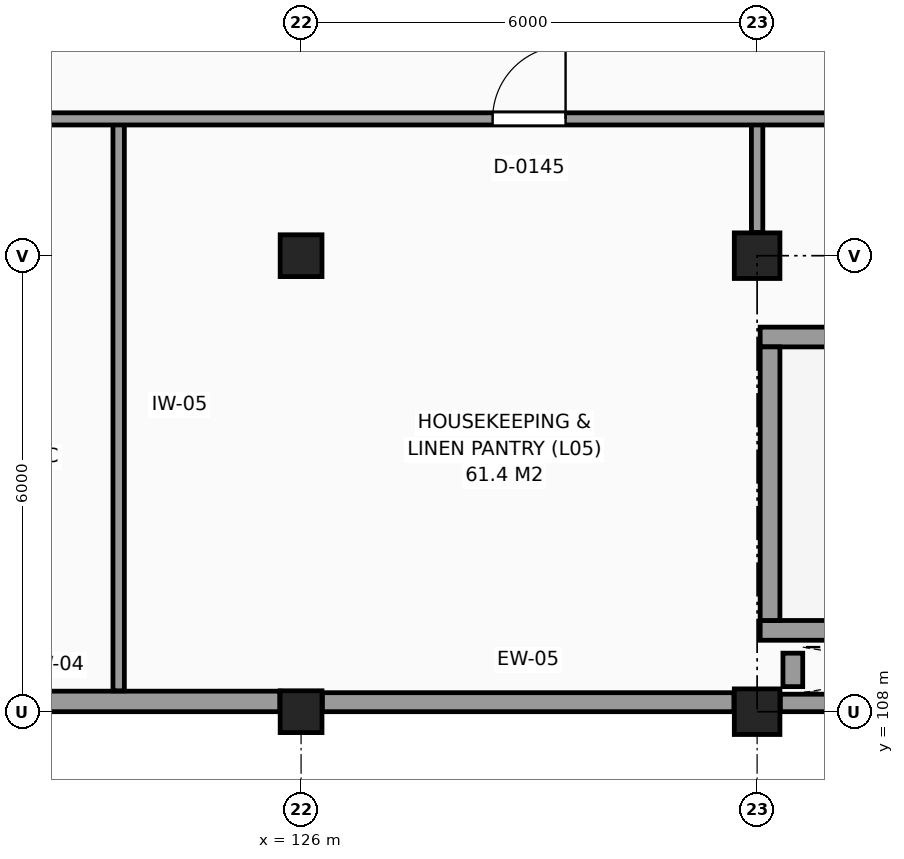
"""IFC4 building model, lengths in metres.
Left out: names, types, materials, properties, quantities, classifications, styles, units other than length and angle.
Written with IfcOpenShell. Run it as: python <this file> out.ifc"""

import sys

from ifc_helpers import new_model, si_unit, direction, frame, frame_2d, origin, origin_2d, place, context, subcontext, project, spatial, rectangle, extrude, element, fill, save


model = new_model("IFC4")
c1 = context("Model", 3, precision=1e-05, world=origin(), true_north=direction((0.0, 1.0)))
c2 = subcontext(c1, "Body", "Model", "MODEL_VIEW")
j1 = project(units=[si_unit("LENGTHUNIT", "METRE"), si_unit("PLANEANGLEUNIT", "RADIAN")], contexts=[c1])
p1 = place(None, origin())
s1 = spatial("IfcSite", under=j1, at=p1, CompositionType="ELEMENT")
p2 = place(p1, origin())
s2 = spatial("IfcBuilding", under=s1, at=p2, CompositionType="ELEMENT")
p3 = place(p2, frame((0.0, 0.0, 24.6)))
s3 = spatial("IfcBuildingStorey", under=s2, at=p3, CompositionType="ELEMENT", Elevation=24.6)
for number, where, z_axis, x_axis in (
    (1, (126.0, 108.0, 0.0), (0.0, 0.0, 1.0), (1.0, 0.0, 0.0)),
    (2, (126.0, 114.0, 0.0), (0.0, 0.0, 1.0), (1.0, 0.0, 0.0)),
):
    element("IfcColumn", number, at=place(p3, frame(where, z_axis=z_axis, x_axis=x_axis)), inside=s3, PredefinedType="COLUMN", context=c2, shape_type="SweptSolid", body=[
        extrude(rectangle(XDim=0.55, YDim=0.55, at=origin_2d()), origin(), (0.0, 0.0, 1.0), 3.6),
    ])
for number, where, z_axis, x_axis in (
    (3, (132.0, 108.0, 0.0), (0.0, 0.0, 1.0), (1.0, 0.0, 0.0)),
    (4, (132.0, 114.0, 0.0), (0.0, 0.0, 1.0), (1.0, 0.0, 0.0)),
):
    element("IfcColumn", number, at=place(p3, frame(where, z_axis=z_axis, x_axis=x_axis)), inside=s3, PredefinedType="COLUMN", context=c2, shape_type="SweptSolid", body=[
        extrude(rectangle(XDim=0.6, YDim=0.6, at=origin_2d()), origin(), (0.0, 0.0, 1.0), 3.6),
    ])
p4 = place(p3, frame((120.305, 108.135, 0.0), z_axis=(0.0, 0.0, 1.0), x_axis=(1.0, 0.0, 0.0)))
e5 = element("IfcWall", 5, at=p4, inside=s3, PredefinedType="SOLIDWALL", context=c2, shape_type="SweptSolid", body=[
    extrude(rectangle(XDim=5.415, YDim=0.27, at=frame_2d((2.708, 0.0))), origin(), (0.0, 0.0, 1.0), 2.73),
])
p5 = place(p3, frame((126.28, 108.125, 0.0), z_axis=(0.0, 0.0, 1.0), x_axis=(1.0, 0.0, 0.0)))
e6 = element("IfcWall", 6, at=p5, inside=s3, PredefinedType="SOLIDWALL", context=c2, shape_type="SweptSolid", body=[
    extrude(rectangle(XDim=5.415, YDim=0.25, at=frame_2d((2.708, 0.0))), origin(), (0.0, 0.0, 1.0), 2.73),
])
p6 = place(p3, frame((132.305, 108.115, 0.0), z_axis=(0.0, 0.0, 1.0), x_axis=(1.0, 0.0, 0.0)))
e7 = element("IfcWall", 7, at=p6, inside=s3, PredefinedType="SOLIDWALL", context=c2, shape_type="SweptSolid", body=[
    extrude(rectangle(XDim=5.415, YDim=0.23, at=frame_2d((2.708, 0.0))), origin(), (0.0, 0.0, 1.0), 3.38),
])
for number, where, z_axis, x_axis in (
    (8, (132.04, 109.07, 0.0), (0.0, 0.0, 1.0), (1.0, 0.0, 0.0)),
    (9, (132.04, 112.93, 0.0), (0.0, 0.0, 1.0), (1.0, 0.0, 0.0)),
):
    element("IfcWall", number, at=place(p3, frame(where, z_axis=z_axis, x_axis=x_axis)), inside=s3, PredefinedType="SHEAR", context=c2, shape_type="SweptSolid", body=[
        extrude(rectangle(XDim=10.72, YDim=0.26, at=frame_2d((5.36, 0.0))), origin(), (0.0, 0.0, 1.0), 3.6),
    ])
p7 = place(p3, frame((132.17, 109.2, 0.0), z_axis=(0.0, 0.0, 1.0), x_axis=(0.0, 1.0, 0.0)))
e10 = element("IfcWall", 10, at=p7, inside=s3, PredefinedType="SHEAR", context=c2, shape_type="SweptSolid", body=[
    extrude(rectangle(XDim=3.6, YDim=0.26, at=frame_2d((1.8, 0.0))), origin(), (0.0, 0.0, 1.0), 3.6),
])
p8 = place(p3, frame((132.47, 108.33, 0.0), z_axis=(0.0, 0.0, 1.0), x_axis=(0.0, 1.0, 0.0)))
e11 = element("IfcWall", 11, at=p8, inside=s3, PredefinedType="SHEAR", context=c2, shape_type="SweptSolid", body=[
    extrude(rectangle(XDim=0.44, YDim=0.26, at=frame_2d((0.22, 0.0))), origin(), (0.0, 0.0, 1.0), 3.6),
])
p9 = place(p3, frame((123.6, 108.275, 0.0), z_axis=(0.0, 0.0, 1.0), x_axis=(0.0, 1.0, 0.0)))
e12 = element("IfcWall", 12, at=p9, inside=s3, PredefinedType="PARTITIONING", context=c2, shape_type="SweptSolid", body=[
    extrude(rectangle(XDim=7.525, YDim=0.15, at=frame_2d((3.763, 0.0))), origin(), (0.0, 0.0, 1.0), 3.38),
])
p10 = place(p3, frame((132.0, 114.305, 0.0), z_axis=(0.0, 0.0, 1.0), x_axis=(0.0, 1.0, 0.0)))
e13 = element("IfcWall", 13, at=p10, inside=s3, PredefinedType="PARTITIONING", context=c2, shape_type="SweptSolid", body=[
    extrude(rectangle(XDim=1.495, YDim=0.15, at=frame_2d((0.748, 0.0))), origin(), (0.0, 0.0, 1.0), 2.58),
])
p11 = place(p3, frame((66.255, 115.8, 0.0), z_axis=(0.0, 0.0, 1.0), x_axis=(1.0, 0.0, 0.0)))
e14 = element("IfcWall", 14, at=p11, inside=s3, PredefinedType="PARTITIONING", context=c2, shape_type="SweptSolid", body=[
    extrude(rectangle(XDim=103.545, YDim=0.16, at=frame_2d((51.772, 0.0))), origin(), (0.0, 0.0, 1.0), 3.38),
])
p12 = place(p11, frame((80.145, 0.0, 0.0)))
e15 = element("IfcOpeningElement", 15, at=p12, cuts=e14, PredefinedType="OPENING", context=c2, shape_type="SweptSolid", body=[
    extrude(rectangle(XDim=1.2, YDim=2.2, at=frame_2d((0.6, 1.1))), frame((0.0, 0.09, 0.0), z_axis=(0.0, -1.0, 0.0), x_axis=(1.0, 0.0, 0.0)), (0.0, 0.0, 1.0), 0.18),
])
p13 = place(p11, frame((50.145, 0.0, 0.0)))
e16 = element("IfcOpeningElement", 16, at=p13, cuts=e14, PredefinedType="OPENING", context=c2, shape_type="SweptSolid", body=[
    extrude(rectangle(XDim=1.2, YDim=2.2, at=frame_2d((0.6, 1.1))), frame((0.0, 0.09, 0.0), z_axis=(0.0, -1.0, 0.0), x_axis=(1.0, 0.0, 0.0)), (0.0, 0.0, 1.0), 0.18),
])
p14 = place(p11, frame((8.995, 0.0, 0.0)))
e17 = element("IfcOpeningElement", 17, at=p14, cuts=e14, PredefinedType="OPENING", context=c2, shape_type="SweptSolid", body=[
    extrude(rectangle(XDim=1.1, YDim=2.15, at=frame_2d((0.55, 1.075))), frame((0.0, 0.09, 0.0), z_axis=(0.0, -1.0, 0.0), x_axis=(1.0, 0.0, 0.0)), (0.0, 0.0, 1.0), 0.18),
])
p15 = place(p11, frame((55.295, 0.0, 0.0)))
e18 = element("IfcOpeningElement", 18, at=p15, cuts=e14, PredefinedType="OPENING", context=c2, shape_type="SweptSolid", body=[
    extrude(rectangle(XDim=1.0, YDim=2.15, at=frame_2d((0.5, 1.075))), frame((0.0, 0.09, 0.0), z_axis=(0.0, -1.0, 0.0), x_axis=(1.0, 0.0, 0.0)), (0.0, 0.0, 1.0), 0.18),
])
p16 = place(p11, frame((62.265, 0.0, 0.0)))
e19 = element("IfcOpeningElement", 19, at=p16, cuts=e14, PredefinedType="OPENING", context=c2, shape_type="SweptSolid", body=[
    extrude(rectangle(XDim=0.96, YDim=2.15, at=frame_2d((0.48, 1.075))), frame((0.0, 0.09, 0.0), z_axis=(0.0, -1.0, 0.0), x_axis=(1.0, 0.0, 0.0)), (0.0, 0.0, 1.0), 0.18),
])
p17 = place(p11, frame((31.945, 0.0, 0.0)))
e20 = element("IfcOpeningElement", 20, at=p17, cuts=e14, PredefinedType="OPENING", context=c2, shape_type="SweptSolid", body=[
    extrude(rectangle(XDim=1.6, YDim=2.25, at=frame_2d((0.8, 1.125))), frame((0.0, 0.09, 0.0), z_axis=(0.0, -1.0, 0.0), x_axis=(1.0, 0.0, 0.0)), (0.0, 0.0, 1.0), 0.18),
])
p18 = place(p11, frame((18.57, 0.0, 0.0)))
e21 = element("IfcOpeningElement", 21, at=p18, cuts=e14, PredefinedType="OPENING", context=c2, shape_type="SweptSolid", body=[
    extrude(rectangle(XDim=0.95, YDim=2.1, at=frame_2d((0.475, 1.05))), frame((0.0, 0.09, 0.0), z_axis=(0.0, -1.0, 0.0), x_axis=(1.0, 0.0, 0.0)), (0.0, 0.0, 1.0), 0.18),
])
p19 = place(p11, frame((24.57, 0.0, 0.0)))
e22 = element("IfcOpeningElement", 22, at=p19, cuts=e14, PredefinedType="OPENING", context=c2, shape_type="SweptSolid", body=[
    extrude(rectangle(XDim=0.95, YDim=2.1, at=frame_2d((0.475, 1.05))), frame((0.0, 0.09, 0.0), z_axis=(0.0, -1.0, 0.0), x_axis=(1.0, 0.0, 0.0)), (0.0, 0.0, 1.0), 0.18),
])
p20 = place(p11, frame((84.47, 0.0, 0.0)))
e23 = element("IfcOpeningElement", 23, at=p20, cuts=e14, PredefinedType="OPENING", context=c2, shape_type="SweptSolid", body=[
    extrude(rectangle(XDim=0.95, YDim=2.1, at=frame_2d((0.475, 1.05))), frame((0.0, 0.09, 0.0), z_axis=(0.0, -1.0, 0.0), x_axis=(1.0, 0.0, 0.0)), (0.0, 0.0, 1.0), 0.18),
])
p21 = place(p16, origin())
e24 = element("IfcDoor", 24, at=p21, inside=s3, OperationType="SINGLE_SWING_RIGHT", PredefinedType="DOOR", context=c2, shape_type="SweptSolid", body=[
    extrude(rectangle(XDim=0.96, YDim=2.15, at=frame_2d((0.48, 1.075))), frame((0.0, 0.025, 0.0), z_axis=(0.0, -1.0, 0.0), x_axis=(1.0, 0.0, 0.0)), (0.0, 0.0, 1.0), 0.05),
])
fill(e19, e24)
save(model, sys.argv[1])
